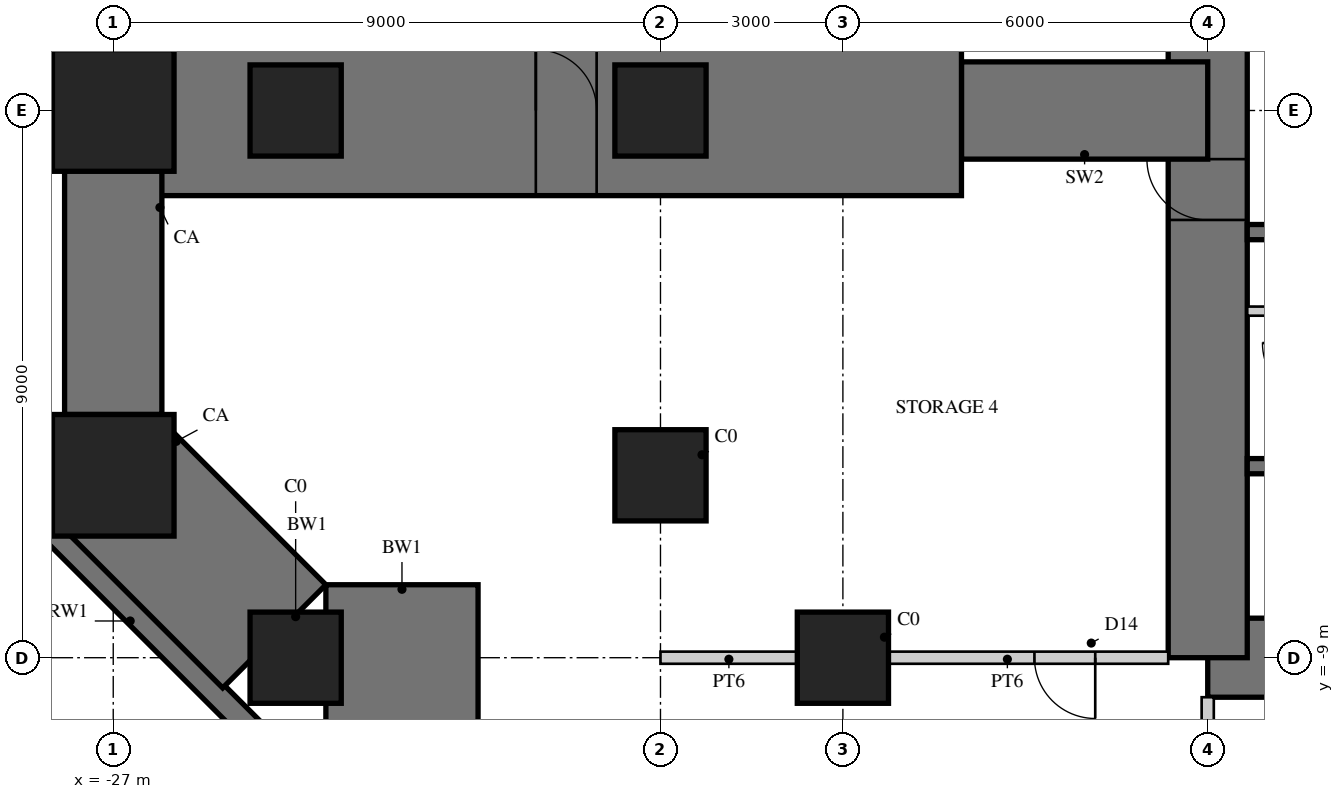
"""IFC4 building model, lengths in metres.
Left out: names, types, materials, properties, quantities, classifications, styles, units other than length and angle.
Written with IfcOpenShell. Run it as: python <this file> out.ifc"""

import sys

from ifc_helpers import new_model, si_unit, direction, frame, frame_2d, origin, origin_2d, place, context, subcontext, project, spatial, polyline, rectangle, outline, extrude, element, fill, save


model = new_model("IFC4")
c1 = context("Model", 3, precision=1e-05, world=origin(), true_north=direction((0.0, 1.0)))
c2 = subcontext(c1, "Body", "Model", "MODEL_VIEW")
j1 = project(units=[si_unit("LENGTHUNIT", "METRE"), si_unit("PLANEANGLEUNIT", "RADIAN")], contexts=[c1])
p1 = place(None, origin())
s1 = spatial("IfcSite", under=j1, at=p1, CompositionType="ELEMENT")
p2 = place(p1, origin())
s2 = spatial("IfcBuilding", under=s1, at=p2, CompositionType="ELEMENT")
p3 = place(p2, frame((0.0, 0.0, -4.0)))
s3 = spatial("IfcBuildingStorey", under=s2, at=p3, CompositionType="ELEMENT", Elevation=-4.0)
p4 = place(p3, origin())
e1 = element("IfcWall", 1, at=p4, inside=s3, PredefinedType="SOLIDWALL", context=c2, shape_type="SweptSolid", body=[
    extrude(outline(polyline([(-24.476, -10.15), (-24.642, -10.55), (-28.55, -6.642), (-28.15, -6.476), (-24.476, -10.15)])), origin(), (0.0, 0.0, 1.0), 4.0),
])
p5 = place(p3, frame((-9.0, -9.0, 0.0), z_axis=(0.0, 0.0, 1.0), x_axis=(1.0, 0.0, 0.0)))
e2 = element("IfcWall", 2, at=p5, inside=s3, PredefinedType="SHEAR", context=c2, shape_type="SweptSolid", body=[
    extrude(rectangle(XDim=18.0, YDim=1.3, at=frame_2d((9.0, 0.0))), origin(), (0.0, 0.0, 1.0), 4.0),
])
p6 = place(p5, frame((9.8, 0.0, 0.0)))
e3 = element("IfcOpeningElement", 3, at=p6, cuts=e2, PredefinedType="OPENING", context=c2, shape_type="SweptSolid", body=[
    extrude(rectangle(XDim=1.0, YDim=2.4, at=frame_2d((0.5, 1.2))), frame((0.0, 0.66, 0.0), z_axis=(0.0, -1.0, 0.0), x_axis=(1.0, 0.0, 0.0)), (0.0, 0.0, 1.0), 1.32),
])
p7 = place(p3, frame((-9.0, 9.0, 0.0), z_axis=(0.0, 0.0, 1.0), x_axis=(0.0, -1.0, 0.0)))
e4 = element("IfcWall", 4, at=p7, inside=s3, PredefinedType="SHEAR", context=c2, shape_type="SweptSolid", body=[
    extrude(rectangle(XDim=18.0, YDim=1.3, at=frame_2d((9.0, 0.0))), origin(), (0.0, 0.0, 1.0), 4.0),
])
p8 = place(p7, frame((9.8, 0.0, 0.0)))
e5 = element("IfcOpeningElement", 5, at=p8, cuts=e4, PredefinedType="OPENING", context=c2, shape_type="SweptSolid", body=[
    extrude(rectangle(XDim=1.0, YDim=2.4, at=frame_2d((0.5, 1.2))), frame((0.0, 0.66, 0.0), z_axis=(0.0, -1.0, 0.0), x_axis=(1.0, 0.0, 0.0)), (0.0, 0.0, 1.0), 1.32),
])
for number, where, z_axis, x_axis in (
    (6, (-1.925, -2.0, 0.0), (0.0, 0.0, 1.0), (-1.0, 0.0, 0.0)),
    (7, (-1.925, -5.85, 0.0), (0.0, 0.0, 1.0), (-1.0, 0.0, 0.0)),
):
    element("IfcWall", number, at=place(p3, frame(where, z_axis=z_axis, x_axis=x_axis)), inside=s3, PredefinedType="SHEAR", context=c2, shape_type="SweptSolid", body=[
        extrude(rectangle(XDim=6.425, YDim=0.25, at=frame_2d((3.212, 0.0))), origin(), (0.0, 0.0, 1.0), 4.0),
    ])
p9 = place(p3, frame((-1.925, -3.3, 0.0), z_axis=(0.0, 0.0, 1.0), x_axis=(-1.0, 0.0, 0.0)))
e8 = element("IfcWall", 8, at=p9, inside=s3, PredefinedType="PARTITIONING", context=c2, shape_type="SweptSolid", body=[
    extrude(rectangle(XDim=6.425, YDim=0.15, at=frame_2d((3.212, 0.0))), origin(), (0.0, 0.0, 1.0), 4.0),
])
p10 = place(p9, frame((0.075, 0.0, 0.0)))
e9 = element("IfcOpeningElement", 9, at=p10, cuts=e8, PredefinedType="OPENING", context=c2, shape_type="SweptSolid", body=[
    extrude(rectangle(XDim=0.8, YDim=2.1, at=frame_2d((0.4, 1.05))), frame((0.0, 0.085, 0.0), z_axis=(0.0, -1.0, 0.0), x_axis=(1.0, 0.0, 0.0)), (0.0, 0.0, 1.0), 0.17),
])
p11 = place(p9, frame((3.675, 0.0, 0.0)))
e10 = element("IfcOpeningElement", 10, at=p11, cuts=e8, PredefinedType="OPENING", context=c2, shape_type="SweptSolid", body=[
    extrude(rectangle(XDim=0.8, YDim=2.1, at=frame_2d((0.4, 1.05))), frame((0.0, 0.085, 0.0), z_axis=(0.0, -1.0, 0.0), x_axis=(1.0, 0.0, 0.0)), (0.0, 0.0, 1.0), 0.17),
])
p12 = place(p3, frame((-9.0, 0.0, 0.0), z_axis=(0.0, 0.0, 1.0), x_axis=(-1.0, 0.0, 0.0)))
e11 = element("IfcWall", 11, at=p12, inside=s3, PredefinedType="SHEAR", context=c2, shape_type="SweptSolid", body=[
    extrude(rectangle(XDim=4.05, YDim=1.6, at=frame_2d((2.025, 0.0))), origin(), (0.0, 0.0, 1.0), 4.0),
])
p13 = place(p3, frame((-13.05, 0.0, 0.0), z_axis=(0.0, 0.0, 1.0), x_axis=(-1.0, 0.0, 0.0)))
e12 = element("IfcWall", 12, at=p13, inside=s3, PredefinedType="SHEAR", context=c2, shape_type="SweptSolid", body=[
    extrude(rectangle(XDim=13.95, YDim=2.8, at=frame_2d((6.975, 0.0))), origin(), (0.0, 0.0, 1.0), 4.0),
])
p14 = place(p13, frame((6.0, 0.0, 0.0)))
e13 = element("IfcOpeningElement", 13, at=p14, cuts=e12, PredefinedType="OPENING", context=c2, shape_type="SweptSolid", body=[
    extrude(rectangle(XDim=1.0, YDim=2.2, at=frame_2d((0.5, 1.1))), frame((0.0, 1.41, 0.0), z_axis=(0.0, -1.0, 0.0), x_axis=(1.0, 0.0, 0.0)), (0.0, 0.0, 1.0), 2.82),
])
p15 = place(p3, frame((-21.0, -9.0, 0.0), z_axis=(0.0, 0.0, 1.0), x_axis=(-1.0, 0.0, 0.0)))
e14 = element("IfcWall", 14, at=p15, inside=s3, PredefinedType="SHEAR", context=c2, shape_type="SweptSolid", body=[
    extrude(rectangle(XDim=2.503, YDim=2.4, at=frame_2d((1.251, 0.0))), origin(), (0.0, 0.0, 1.0), 4.0),
])
p16 = place(p3, frame((-24.352, -8.648, 0.0), z_axis=(0.0, 0.0, 1.0), x_axis=(-0.707106781187, 0.707106781187, 0.0)))
e15 = element("IfcWall", 15, at=p16, inside=s3, PredefinedType="SHEAR", context=c2, shape_type="SweptSolid", body=[
    extrude(rectangle(XDim=3.745, YDim=2.4, at=frame_2d((1.873, 0.0))), origin(), (0.0, 0.0, 1.0), 4.0),
])
p17 = place(p3, frame((-27.0, 5.0, 0.0), z_axis=(0.0, 0.0, 1.0), x_axis=(0.0, -1.0, 0.0)))
e16 = element("IfcWall", 16, at=p17, inside=s3, PredefinedType="SHEAR", context=c2, shape_type="SweptSolid", body=[
    extrude(rectangle(XDim=10.0, YDim=1.6, at=frame_2d((5.0, 0.0))), origin(), (0.0, 0.0, 1.0), 4.0),
])
for number, where, z_axis, x_axis in (
    (17, (-15.0, -9.0, 0.0), (0.0, 0.0, 1.0), (1.0, 0.0, 0.0)),
    (18, (-24.0, -9.0, 0.0), (0.0, 0.0, 1.0), (1.0, 0.0, 0.0)),
):
    element("IfcColumn", number, at=place(p3, frame(where, z_axis=z_axis, x_axis=x_axis)), inside=s3, PredefinedType="COLUMN", context=c2, shape_type="SweptSolid", body=[
        extrude(rectangle(XDim=1.5, YDim=1.5, at=origin_2d()), origin(), (0.0, 0.0, 1.0), 4.0),
    ])
for number, where, z_axis, x_axis in (
    (19, (-27.0, 0.0, 0.0), (0.0, 0.0, 1.0), (1.0, 0.0, 0.0)),
    (20, (-27.0, -6.0, 0.0), (0.0, 0.0, 1.0), (1.0, 0.0, 0.0)),
):
    element("IfcColumn", number, at=place(p3, frame(where, z_axis=z_axis, x_axis=x_axis)), inside=s3, PredefinedType="COLUMN", context=c2, shape_type="SweptSolid", body=[
        extrude(rectangle(XDim=2.0, YDim=2.0, at=origin_2d()), origin(), (0.0, 0.0, 1.0), 4.0),
    ])
for number, where, z_axis, x_axis in (
    (21, (-18.0, 0.0, 0.0), (0.0, 0.0, 1.0), (1.0, 0.0, 0.0)),
    (22, (-18.0, -6.0, 0.0), (0.0, 0.0, 1.0), (1.0, 0.0, 0.0)),
    (23, (-24.0, 0.0, 0.0), (0.0, 0.0, 1.0), (1.0, 0.0, 0.0)),
):
    element("IfcColumn", number, at=place(p3, frame(where, z_axis=z_axis, x_axis=x_axis)), inside=s3, PredefinedType="COLUMN", context=c2, shape_type="SweptSolid", body=[
        extrude(rectangle(XDim=1.5, YDim=1.5, at=origin_2d()), origin(), (0.0, 0.0, 1.0), 4.0),
    ])
p18 = place(p3, frame((-9.65, -9.0, 0.0), z_axis=(0.0, 0.0, 1.0), x_axis=(-1.0, 0.0, 0.0)))
e24 = element("IfcWall", 24, at=p18, inside=s3, PredefinedType="SOLIDWALL", context=c2, shape_type="SweptSolid", body=[
    extrude(rectangle(XDim=4.6, YDim=0.2, at=frame_2d((2.3, 0.0))), origin(), (0.0, 0.0, 1.0), 2.7),
])
p19 = place(p18, frame((1.2, 0.0, 0.0)))
e25 = element("IfcOpeningElement", 25, at=p19, cuts=e24, PredefinedType="OPENING", context=c2, shape_type="SweptSolid", body=[
    extrude(rectangle(XDim=1.0, YDim=2.2, at=frame_2d((0.5, 1.1))), frame((0.0, 0.11, 0.0), z_axis=(0.0, -1.0, 0.0), x_axis=(1.0, 0.0, 0.0)), (0.0, 0.0, 1.0), 0.22),
])
p20 = place(p3, frame((-15.75, -9.0, 0.0), z_axis=(0.0, 0.0, 1.0), x_axis=(-1.0, 0.0, 0.0)))
e26 = element("IfcWall", 26, at=p20, inside=s3, PredefinedType="SOLIDWALL", context=c2, shape_type="SweptSolid", body=[
    extrude(rectangle(XDim=2.25, YDim=0.2, at=frame_2d((1.125, 0.0))), origin(), (0.0, 0.0, 1.0), 2.7),
])
p21 = place(p3, frame((-9.0, -14.25, 0.0), z_axis=(0.0, 0.0, 1.0), x_axis=(0.0, 1.0, 0.0)))
e27 = element("IfcWall", 27, at=p21, inside=s3, PredefinedType="SOLIDWALL", context=c2, shape_type="SweptSolid", body=[
    extrude(rectangle(XDim=4.6, YDim=0.2, at=frame_2d((2.3, 0.0))), origin(), (0.0, 0.0, 1.0), 2.7),
])
p22 = place(p19, origin())
e28 = element("IfcDoor", 28, at=p22, inside=s3, OperationType="SINGLE_SWING_LEFT", PredefinedType="DOOR", context=c2, shape_type="SweptSolid", body=[
    extrude(rectangle(XDim=1.0, YDim=2.2, at=frame_2d((0.5, 1.1))), frame((0.0, 0.025, 0.0), z_axis=(0.0, -1.0, 0.0), x_axis=(1.0, 0.0, 0.0)), (0.0, 0.0, 1.0), 0.05),
])
fill(e25, e28)
p23 = place(p14, frame((1.0, 0.0, 0.0), z_axis=(0.0, 0.0, 1.0), x_axis=(-1.0, 0.0, 0.0)))
e29 = element("IfcDoor", 29, at=p23, inside=s3, OperationType="SINGLE_SWING_LEFT", PredefinedType="DOOR", context=c2, shape_type="SweptSolid", body=[
    extrude(rectangle(XDim=1.0, YDim=2.2, at=frame_2d((0.5, 1.1))), frame((0.0, 0.025, 0.0), z_axis=(0.0, -1.0, 0.0), x_axis=(1.0, 0.0, 0.0)), (0.0, 0.0, 1.0), 0.05),
])
fill(e13, e29)
p24 = place(p8, frame((1.0, 0.0, 0.0), z_axis=(0.0, 0.0, 1.0), x_axis=(-1.0, 0.0, 0.0)))
e30 = element("IfcDoor", 30, at=p24, inside=s3, OperationType="SINGLE_SWING_RIGHT", PredefinedType="DOOR", context=c2, shape_type="SweptSolid", body=[
    extrude(rectangle(XDim=1.0, YDim=2.4, at=frame_2d((0.5, 1.2))), frame((0.0, -0.005, 0.0), z_axis=(0.0, -1.0, 0.0), x_axis=(1.0, 0.0, 0.0)), (0.0, 0.0, 1.0), 0.05),
])
fill(e5, e30)
save(model, sys.argv[1])
